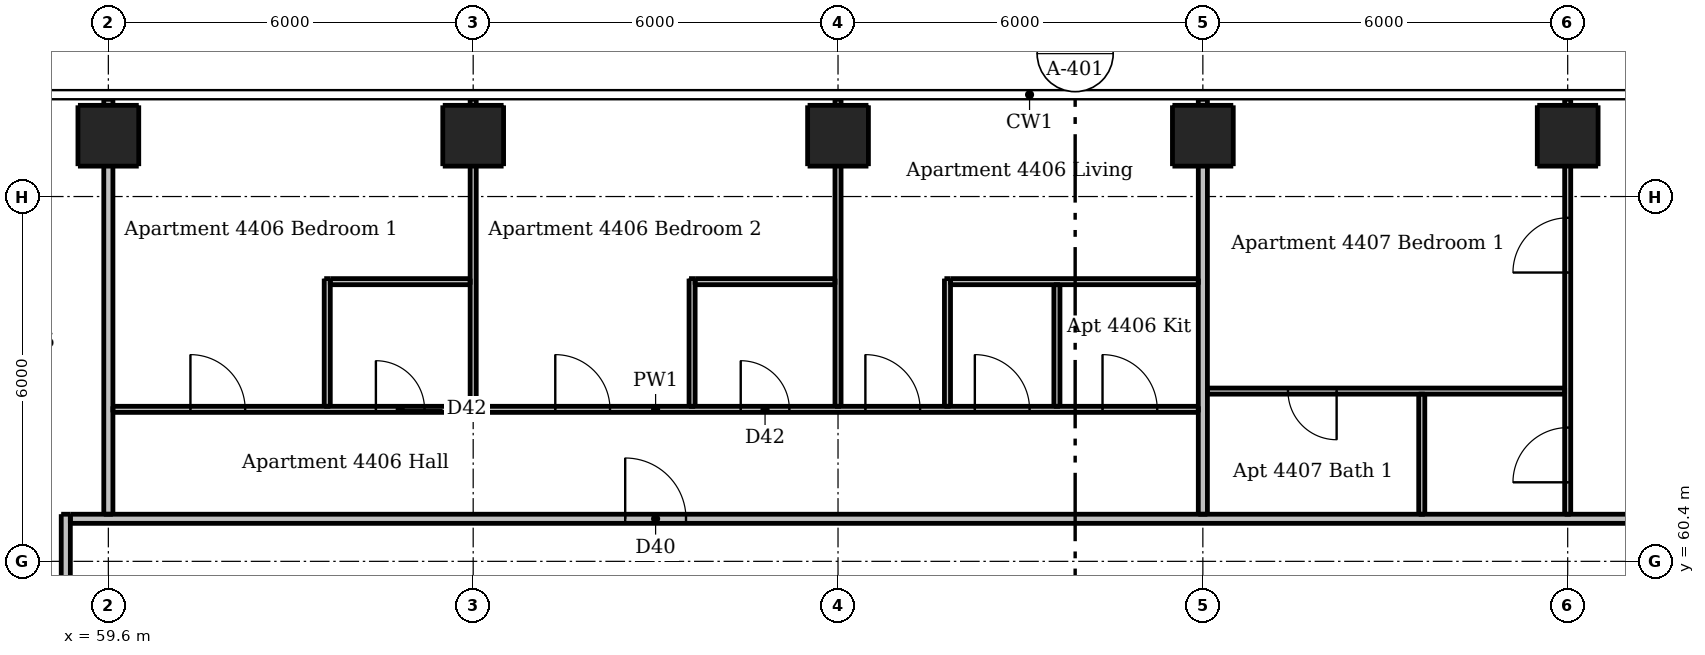
"""IFC4 building model, lengths in metres.
Left out: names, types, materials, properties, quantities, classifications, styles, units other than length and angle.
Written with IfcOpenShell. Run it as: python <this file> out.ifc"""

import sys

from ifc_helpers import new_model, si_unit, direction, frame, frame_2d, origin, origin_2d, place, context, subcontext, project, spatial, rectangle, extrude, element, fill, save


model = new_model("IFC4")
c1 = context("Model", 3, precision=1e-05, world=origin(), true_north=direction((0.0, 1.0)))
c2 = subcontext(c1, "Body", "Model", "MODEL_VIEW")
j1 = project(units=[si_unit("LENGTHUNIT", "METRE"), si_unit("PLANEANGLEUNIT", "RADIAN")], contexts=[c1])
p1 = place(None, origin())
s1 = spatial("IfcSite", under=j1, at=p1, CompositionType="ELEMENT")
p2 = place(p1, origin())
s2 = spatial("IfcBuilding", under=s1, at=p2, CompositionType="ELEMENT")
p3 = place(p2, frame((0.0, 0.0, 164.8)))
s3 = spatial("IfcBuildingStorey", under=s2, at=p3, CompositionType="ELEMENT", Elevation=164.8)
for number, where, z_axis, x_axis in (
    (1, (59.6, 67.4, 0.0), (0.0, 0.0, 1.0), (1.0, 0.0, 0.0)),
    (2, (65.6, 67.4, 0.0), (0.0, 0.0, 1.0), (1.0, 0.0, 0.0)),
    (3, (71.6, 67.4, 0.0), (0.0, 0.0, 1.0), (1.0, 0.0, 0.0)),
    (4, (77.6, 67.4, 0.0), (0.0, 0.0, 1.0), (1.0, 0.0, 0.0)),
    (5, (83.6, 67.4, 0.0), (0.0, 0.0, 1.0), (1.0, 0.0, 0.0)),
):
    element("IfcColumn", number, at=place(p3, frame(where, z_axis=z_axis, x_axis=x_axis)), inside=s3, PredefinedType="COLUMN", context=c2, shape_type="SweptSolid", body=[
        extrude(rectangle(XDim=1.0, YDim=1.0, at=origin_2d()), origin(), (0.0, 0.0, 1.0), 3.05),
    ])
p4 = place(p3, frame((63.2, 62.95, 0.0), z_axis=(0.0, 0.0, 1.0), x_axis=(0.0, 1.0, 0.0)))
e6 = element("IfcWall", 6, at=p4, inside=s3, PredefinedType="PARTITIONING", context=c2, shape_type="SweptSolid", body=[
    extrude(rectangle(XDim=2.1, YDim=0.1, at=frame_2d((1.05, 0.0))), origin(), (0.0, 0.0, 1.0), 3.05),
])
p5 = place(p3, frame((65.6, 62.95, 0.0), z_axis=(0.0, 0.0, 1.0), x_axis=(0.0, 1.0, 0.0)))
e7 = element("IfcWall", 7, at=p5, inside=s3, PredefinedType="PARTITIONING", context=c2, shape_type="SweptSolid", body=[
    extrude(rectangle(XDim=5.05, YDim=0.1, at=frame_2d((2.525, 0.0))), origin(), (0.0, 0.0, 1.0), 2.516),
])
p6 = place(p3, frame((69.2, 62.95, 0.0), z_axis=(0.0, 0.0, 1.0), x_axis=(0.0, 1.0, 0.0)))
e8 = element("IfcWall", 8, at=p6, inside=s3, PredefinedType="PARTITIONING", context=c2, shape_type="SweptSolid", body=[
    extrude(rectangle(XDim=2.1, YDim=0.1, at=frame_2d((1.05, 0.0))), origin(), (0.0, 0.0, 1.0), 3.05),
])
p7 = place(p3, frame((71.6, 62.95, 0.0), z_axis=(0.0, 0.0, 1.0), x_axis=(0.0, 1.0, 0.0)))
e9 = element("IfcWall", 9, at=p7, inside=s3, PredefinedType="PARTITIONING", context=c2, shape_type="SweptSolid", body=[
    extrude(rectangle(XDim=5.05, YDim=0.1, at=frame_2d((2.525, 0.0))), origin(), (0.0, 0.0, 1.0), 2.516),
])
p8 = place(p3, frame((73.4, 62.95, 0.0), z_axis=(0.0, 0.0, 1.0), x_axis=(0.0, 1.0, 0.0)))
e10 = element("IfcWall", 10, at=p8, inside=s3, PredefinedType="PARTITIONING", context=c2, shape_type="SweptSolid", body=[
    extrude(rectangle(XDim=2.1, YDim=0.1, at=frame_2d((1.05, 0.0))), origin(), (0.0, 0.0, 1.0), 3.05),
])
p9 = place(p3, frame((75.2, 62.95, 0.0), z_axis=(0.0, 0.0, 1.0), x_axis=(0.0, 1.0, 0.0)))
e11 = element("IfcWall", 11, at=p9, inside=s3, PredefinedType="PARTITIONING", context=c2, shape_type="SweptSolid", body=[
    extrude(rectangle(XDim=2.0, YDim=0.1, at=frame_2d((1.0, 0.0))), origin(), (0.0, 0.0, 1.0), 3.05),
])
p10 = place(p3, frame((81.2, 61.175, 0.0), z_axis=(0.0, 0.0, 1.0), x_axis=(0.0, 1.0, 0.0)))
e12 = element("IfcWall", 12, at=p10, inside=s3, PredefinedType="PARTITIONING", context=c2, shape_type="SweptSolid", body=[
    extrude(rectangle(XDim=1.975, YDim=0.1, at=frame_2d((0.987, 0.0))), origin(), (0.0, 0.0, 1.0), 3.05),
])
p11 = place(p3, frame((83.6, 61.175, 0.0), z_axis=(0.0, 0.0, 1.0), x_axis=(0.0, 1.0, 0.0)))
e13 = element("IfcWall", 13, at=p11, inside=s3, PredefinedType="PARTITIONING", context=c2, shape_type="SweptSolid", body=[
    extrude(rectangle(XDim=6.825, YDim=0.1, at=frame_2d((3.413, 0.0))), origin(), (0.0, 0.0, 1.0), 2.516),
])
p12 = place(p11, frame((0.525, 0.0, 0.0)))
e14 = element("IfcOpeningElement", 14, at=p12, cuts=e13, PredefinedType="OPENING", context=c2, shape_type="SweptSolid", body=[
    extrude(rectangle(XDim=0.9, YDim=2.1, at=frame_2d((0.45, 1.05))), frame((0.0, 0.06, 0.0), z_axis=(0.0, -1.0, 0.0), x_axis=(1.0, 0.0, 0.0)), (0.0, 0.0, 1.0), 0.12),
])
p13 = place(p11, frame((3.975, 0.0, 0.0)))
e15 = element("IfcOpeningElement", 15, at=p13, cuts=e13, PredefinedType="OPENING", context=c2, shape_type="SweptSolid", body=[
    extrude(rectangle(XDim=0.9, YDim=2.1, at=frame_2d((0.45, 1.05))), frame((0.0, 0.06, 0.0), z_axis=(0.0, -1.0, 0.0), x_axis=(1.0, 0.0, 0.0)), (0.0, 0.0, 1.0), 0.12),
])
for number, where, z_axis, x_axis in (
    (16, (63.25, 65.0, 0.0), (0.0, 0.0, 1.0), (1.0, 0.0, 0.0)),
    (17, (69.25, 65.0, 0.0), (0.0, 0.0, 1.0), (1.0, 0.0, 0.0)),
):
    element("IfcWall", number, at=place(p3, frame(where, z_axis=z_axis, x_axis=x_axis)), inside=s3, PredefinedType="PARTITIONING", context=c2, shape_type="SweptSolid", body=[
        extrude(rectangle(XDim=2.3, YDim=0.1, at=frame_2d((1.15, 0.0))), origin(), (0.0, 0.0, 1.0), 3.05),
    ])
p14 = place(p3, frame((73.45, 65.0, 0.0), z_axis=(0.0, 0.0, 1.0), x_axis=(1.0, 0.0, 0.0)))
e18 = element("IfcWall", 18, at=p14, inside=s3, PredefinedType="PARTITIONING", context=c2, shape_type="SweptSolid", body=[
    extrude(rectangle(XDim=4.075, YDim=0.1, at=frame_2d((2.038, 0.0))), origin(), (0.0, 0.0, 1.0), 3.05),
])
p15 = place(p3, frame((83.55, 63.2, 0.0), z_axis=(0.0, 0.0, 1.0), x_axis=(-1.0, 0.0, 0.0)))
e19 = element("IfcWall", 19, at=p15, inside=s3, PredefinedType="PARTITIONING", context=c2, shape_type="SweptSolid", body=[
    extrude(rectangle(XDim=5.875, YDim=0.1, at=frame_2d((2.938, 0.0))), origin(), (0.0, 0.0, 1.0), 3.05),
])
p16 = place(p15, frame((3.75, 0.0, 0.0)))
e20 = element("IfcOpeningElement", 20, at=p16, cuts=e19, PredefinedType="OPENING", context=c2, shape_type="SweptSolid", body=[
    extrude(rectangle(XDim=0.8, YDim=2.1, at=frame_2d((0.4, 1.05))), frame((0.0, 0.06, 0.0), z_axis=(0.0, -1.0, 0.0), x_axis=(1.0, 0.0, 0.0)), (0.0, 0.0, 1.0), 0.12),
])
p17 = place(p3, frame((59.675, 62.9, 0.0), z_axis=(0.0, 0.0, 1.0), x_axis=(1.0, 0.0, 0.0)))
e21 = element("IfcWall", 21, at=p17, inside=s3, PredefinedType="PARTITIONING", context=c2, shape_type="SweptSolid", body=[
    extrude(rectangle(XDim=17.85, YDim=0.1, at=frame_2d((8.925, 0.0))), origin(), (0.0, 0.0, 1.0), 3.05),
])
p18 = place(p17, frame((12.375, 0.0, 0.0)))
e22 = element("IfcOpeningElement", 22, at=p18, cuts=e21, PredefinedType="OPENING", context=c2, shape_type="SweptSolid", body=[
    extrude(rectangle(XDim=0.9, YDim=2.1, at=frame_2d((0.45, 1.05))), frame((0.0, 0.06, 0.0), z_axis=(0.0, -1.0, 0.0), x_axis=(1.0, 0.0, 0.0)), (0.0, 0.0, 1.0), 0.12),
])
p19 = place(p17, frame((16.275, 0.0, 0.0)))
e23 = element("IfcOpeningElement", 23, at=p19, cuts=e21, PredefinedType="OPENING", context=c2, shape_type="SweptSolid", body=[
    extrude(rectangle(XDim=0.9, YDim=2.1, at=frame_2d((0.45, 1.05))), frame((0.0, 0.06, 0.0), z_axis=(0.0, -1.0, 0.0), x_axis=(1.0, 0.0, 0.0)), (0.0, 0.0, 1.0), 0.12),
])
p20 = place(p17, frame((14.175, 0.0, 0.0)))
e24 = element("IfcOpeningElement", 24, at=p20, cuts=e21, PredefinedType="OPENING", context=c2, shape_type="SweptSolid", body=[
    extrude(rectangle(XDim=0.9, YDim=2.1, at=frame_2d((0.45, 1.05))), frame((0.0, 0.06, 0.0), z_axis=(0.0, -1.0, 0.0), x_axis=(1.0, 0.0, 0.0)), (0.0, 0.0, 1.0), 0.12),
])
p21 = place(p17, frame((1.275, 0.0, 0.0)))
e25 = element("IfcOpeningElement", 25, at=p21, cuts=e21, PredefinedType="OPENING", context=c2, shape_type="SweptSolid", body=[
    extrude(rectangle(XDim=0.9, YDim=2.1, at=frame_2d((0.45, 1.05))), frame((0.0, 0.06, 0.0), z_axis=(0.0, -1.0, 0.0), x_axis=(1.0, 0.0, 0.0)), (0.0, 0.0, 1.0), 0.12),
])
p22 = place(p17, frame((7.275, 0.0, 0.0)))
e26 = element("IfcOpeningElement", 26, at=p22, cuts=e21, PredefinedType="OPENING", context=c2, shape_type="SweptSolid", body=[
    extrude(rectangle(XDim=0.9, YDim=2.1, at=frame_2d((0.45, 1.05))), frame((0.0, 0.06, 0.0), z_axis=(0.0, -1.0, 0.0), x_axis=(1.0, 0.0, 0.0)), (0.0, 0.0, 1.0), 0.12),
])
p23 = place(p17, frame((4.325, 0.0, 0.0)))
e27 = element("IfcOpeningElement", 27, at=p23, cuts=e21, PredefinedType="OPENING", context=c2, shape_type="SweptSolid", body=[
    extrude(rectangle(XDim=0.8, YDim=2.1, at=frame_2d((0.4, 1.05))), frame((0.0, 0.06, 0.0), z_axis=(0.0, -1.0, 0.0), x_axis=(1.0, 0.0, 0.0)), (0.0, 0.0, 1.0), 0.12),
])
p24 = place(p17, frame((10.325, 0.0, 0.0)))
e28 = element("IfcOpeningElement", 28, at=p24, cuts=e21, PredefinedType="OPENING", context=c2, shape_type="SweptSolid", body=[
    extrude(rectangle(XDim=0.8, YDim=2.1, at=frame_2d((0.4, 1.05))), frame((0.0, 0.06, 0.0), z_axis=(0.0, -1.0, 0.0), x_axis=(1.0, 0.0, 0.0)), (0.0, 0.0, 1.0), 0.12),
])
p25 = place(p3, frame((58.9, 30.325, 0.0), z_axis=(0.0, 0.0, 1.0), x_axis=(0.0, 1.0, 0.0)))
e29 = element("IfcWall", 29, at=p25, inside=s3, PredefinedType="PARTITIONING", context=c2, shape_type="SweptSolid", body=[
    extrude(rectangle(XDim=30.85, YDim=0.15, at=frame_2d((15.425, 0.0))), origin(), (0.0, 0.0, 1.0), 3.05),
])
p26 = place(p25, frame((9.225, 0.0, 0.0)))
e30 = element("IfcOpeningElement", 30, at=p26, cuts=e29, PredefinedType="OPENING", context=c2, shape_type="SweptSolid", body=[
    extrude(rectangle(XDim=1.0, YDim=2.1, at=frame_2d((0.5, 1.05))), frame((0.0, 0.085, 0.0), z_axis=(0.0, -1.0, 0.0), x_axis=(1.0, 0.0, 0.0)), (0.0, 0.0, 1.0), 0.17),
])
p27 = place(p25, frame((26.925, 0.0, 0.0)))
e31 = element("IfcOpeningElement", 31, at=p27, cuts=e29, PredefinedType="OPENING", context=c2, shape_type="SweptSolid", body=[
    extrude(rectangle(XDim=1.0, YDim=2.1, at=frame_2d((0.5, 1.05))), frame((0.0, 0.085, 0.0), z_axis=(0.0, -1.0, 0.0), x_axis=(1.0, 0.0, 0.0)), (0.0, 0.0, 1.0), 0.17),
])
p28 = place(p3, frame((59.6, 61.175, 0.0), z_axis=(0.0, 0.0, 1.0), x_axis=(0.0, 1.0, 0.0)))
e32 = element("IfcWall", 32, at=p28, inside=s3, PredefinedType="PARTITIONING", context=c2, shape_type="SweptSolid", body=[
    extrude(rectangle(XDim=6.825, YDim=0.15, at=frame_2d((3.413, 0.0))), origin(), (0.0, 0.0, 1.0), 2.51),
])
p29 = place(p3, frame((77.6, 61.175, 0.0), z_axis=(0.0, 0.0, 1.0), x_axis=(0.0, 1.0, 0.0)))
e33 = element("IfcWall", 33, at=p29, inside=s3, PredefinedType="PARTITIONING", context=c2, shape_type="SweptSolid", body=[
    extrude(rectangle(XDim=6.825, YDim=0.15, at=frame_2d((3.413, 0.0))), origin(), (0.0, 0.0, 1.0), 2.516),
])
p30 = place(p3, frame((58.975, 61.1, 0.0), z_axis=(0.0, 0.0, 1.0), x_axis=(1.0, 0.0, 0.0)))
e34 = element("IfcWall", 34, at=p30, inside=s3, PredefinedType="PARTITIONING", context=c2, shape_type="SweptSolid", body=[
    extrude(rectangle(XDim=29.25, YDim=0.15, at=frame_2d((14.625, 0.0))), origin(), (0.0, 0.0, 1.0), 3.05),
])
p31 = place(p30, frame((9.125, 0.0, 0.0)))
e35 = element("IfcOpeningElement", 35, at=p31, cuts=e34, PredefinedType="OPENING", context=c2, shape_type="SweptSolid", body=[
    extrude(rectangle(XDim=1.0, YDim=2.1, at=frame_2d((0.5, 1.05))), frame((0.0, 0.085, 0.0), z_axis=(0.0, -1.0, 0.0), x_axis=(1.0, 0.0, 0.0)), (0.0, 0.0, 1.0), 0.17),
])
p32 = place(p30, frame((26.475, 0.0, 0.0)))
e36 = element("IfcOpeningElement", 36, at=p32, cuts=e34, PredefinedType="OPENING", context=c2, shape_type="SweptSolid", body=[
    extrude(rectangle(XDim=1.0, YDim=2.1, at=frame_2d((0.5, 1.05))), frame((0.0, 0.085, 0.0), z_axis=(0.0, -1.0, 0.0), x_axis=(1.0, 0.0, 0.0)), (0.0, 0.0, 1.0), 0.17),
])
p33 = place(p31, origin())
e37 = element("IfcDoor", 37, at=p33, inside=s3, OperationType="SINGLE_SWING_LEFT", PredefinedType="DOOR", context=c2, shape_type="SweptSolid", body=[
    extrude(rectangle(XDim=1.0, YDim=2.1, at=frame_2d((0.5, 1.05))), frame((0.0, 0.025, 0.0), z_axis=(0.0, -1.0, 0.0), x_axis=(1.0, 0.0, 0.0)), (0.0, 0.0, 1.0), 0.05),
])
fill(e35, e37)
p34 = place(p18, origin())
e38 = element("IfcDoor", 38, at=p34, inside=s3, OperationType="SINGLE_SWING_LEFT", PredefinedType="DOOR", context=c2, shape_type="SweptSolid", body=[
    extrude(rectangle(XDim=0.9, YDim=2.1, at=frame_2d((0.45, 1.05))), frame((0.0, 0.025, 0.0), z_axis=(0.0, -1.0, 0.0), x_axis=(1.0, 0.0, 0.0)), (0.0, 0.0, 1.0), 0.05),
])
fill(e22, e38)
p35 = place(p19, origin())
e39 = element("IfcDoor", 39, at=p35, inside=s3, OperationType="SINGLE_SWING_LEFT", PredefinedType="DOOR", context=c2, shape_type="SweptSolid", body=[
    extrude(rectangle(XDim=0.9, YDim=2.1, at=frame_2d((0.45, 1.05))), frame((0.0, 0.025, 0.0), z_axis=(0.0, -1.0, 0.0), x_axis=(1.0, 0.0, 0.0)), (0.0, 0.0, 1.0), 0.05),
])
fill(e23, e39)
p36 = place(p20, origin())
e40 = element("IfcDoor", 40, at=p36, inside=s3, OperationType="SINGLE_SWING_LEFT", PredefinedType="DOOR", context=c2, shape_type="SweptSolid", body=[
    extrude(rectangle(XDim=0.9, YDim=2.1, at=frame_2d((0.45, 1.05))), frame((0.0, 0.025, 0.0), z_axis=(0.0, -1.0, 0.0), x_axis=(1.0, 0.0, 0.0)), (0.0, 0.0, 1.0), 0.05),
])
fill(e24, e40)
p37 = place(p21, origin())
e41 = element("IfcDoor", 41, at=p37, inside=s3, OperationType="SINGLE_SWING_LEFT", PredefinedType="DOOR", context=c2, shape_type="SweptSolid", body=[
    extrude(rectangle(XDim=0.9, YDim=2.1, at=frame_2d((0.45, 1.05))), frame((0.0, 0.025, 0.0), z_axis=(0.0, -1.0, 0.0), x_axis=(1.0, 0.0, 0.0)), (0.0, 0.0, 1.0), 0.05),
])
fill(e25, e41)
p38 = place(p22, origin())
e42 = element("IfcDoor", 42, at=p38, inside=s3, OperationType="SINGLE_SWING_LEFT", PredefinedType="DOOR", context=c2, shape_type="SweptSolid", body=[
    extrude(rectangle(XDim=0.9, YDim=2.1, at=frame_2d((0.45, 1.05))), frame((0.0, 0.025, 0.0), z_axis=(0.0, -1.0, 0.0), x_axis=(1.0, 0.0, 0.0)), (0.0, 0.0, 1.0), 0.05),
])
fill(e26, e42)
p39 = place(p23, origin())
e43 = element("IfcDoor", 43, at=p39, inside=s3, OperationType="SINGLE_SWING_LEFT", PredefinedType="DOOR", context=c2, shape_type="SweptSolid", body=[
    extrude(rectangle(XDim=0.8, YDim=2.1, at=frame_2d((0.4, 1.05))), frame((0.0, 0.025, 0.0), z_axis=(0.0, -1.0, 0.0), x_axis=(1.0, 0.0, 0.0)), (0.0, 0.0, 1.0), 0.05),
])
fill(e27, e43)
p40 = place(p24, origin())
e44 = element("IfcDoor", 44, at=p40, inside=s3, OperationType="SINGLE_SWING_LEFT", PredefinedType="DOOR", context=c2, shape_type="SweptSolid", body=[
    extrude(rectangle(XDim=0.8, YDim=2.1, at=frame_2d((0.4, 1.05))), frame((0.0, 0.025, 0.0), z_axis=(0.0, -1.0, 0.0), x_axis=(1.0, 0.0, 0.0)), (0.0, 0.0, 1.0), 0.05),
])
fill(e28, e44)
p41 = place(p12, origin())
e45 = element("IfcDoor", 45, at=p41, inside=s3, OperationType="SINGLE_SWING_LEFT", PredefinedType="DOOR", context=c2, shape_type="SweptSolid", body=[
    extrude(rectangle(XDim=0.9, YDim=2.1, at=frame_2d((0.45, 1.05))), frame((0.0, 0.025, 0.0), z_axis=(0.0, -1.0, 0.0), x_axis=(1.0, 0.0, 0.0)), (0.0, 0.0, 1.0), 0.05),
])
fill(e14, e45)
p42 = place(p13, origin())
e46 = element("IfcDoor", 46, at=p42, inside=s3, OperationType="SINGLE_SWING_LEFT", PredefinedType="DOOR", context=c2, shape_type="SweptSolid", body=[
    extrude(rectangle(XDim=0.9, YDim=2.1, at=frame_2d((0.45, 1.05))), frame((0.0, 0.025, 0.0), z_axis=(0.0, -1.0, 0.0), x_axis=(1.0, 0.0, 0.0)), (0.0, 0.0, 1.0), 0.05),
])
fill(e15, e46)
p43 = place(p16, origin())
e47 = element("IfcDoor", 47, at=p43, inside=s3, OperationType="SINGLE_SWING_LEFT", PredefinedType="DOOR", context=c2, shape_type="SweptSolid", body=[
    extrude(rectangle(XDim=0.8, YDim=2.1, at=frame_2d((0.4, 1.05))), frame((0.0, 0.025, 0.0), z_axis=(0.0, -1.0, 0.0), x_axis=(1.0, 0.0, 0.0)), (0.0, 0.0, 1.0), 0.05),
])
fill(e20, e47)
save(model, sys.argv[1])
